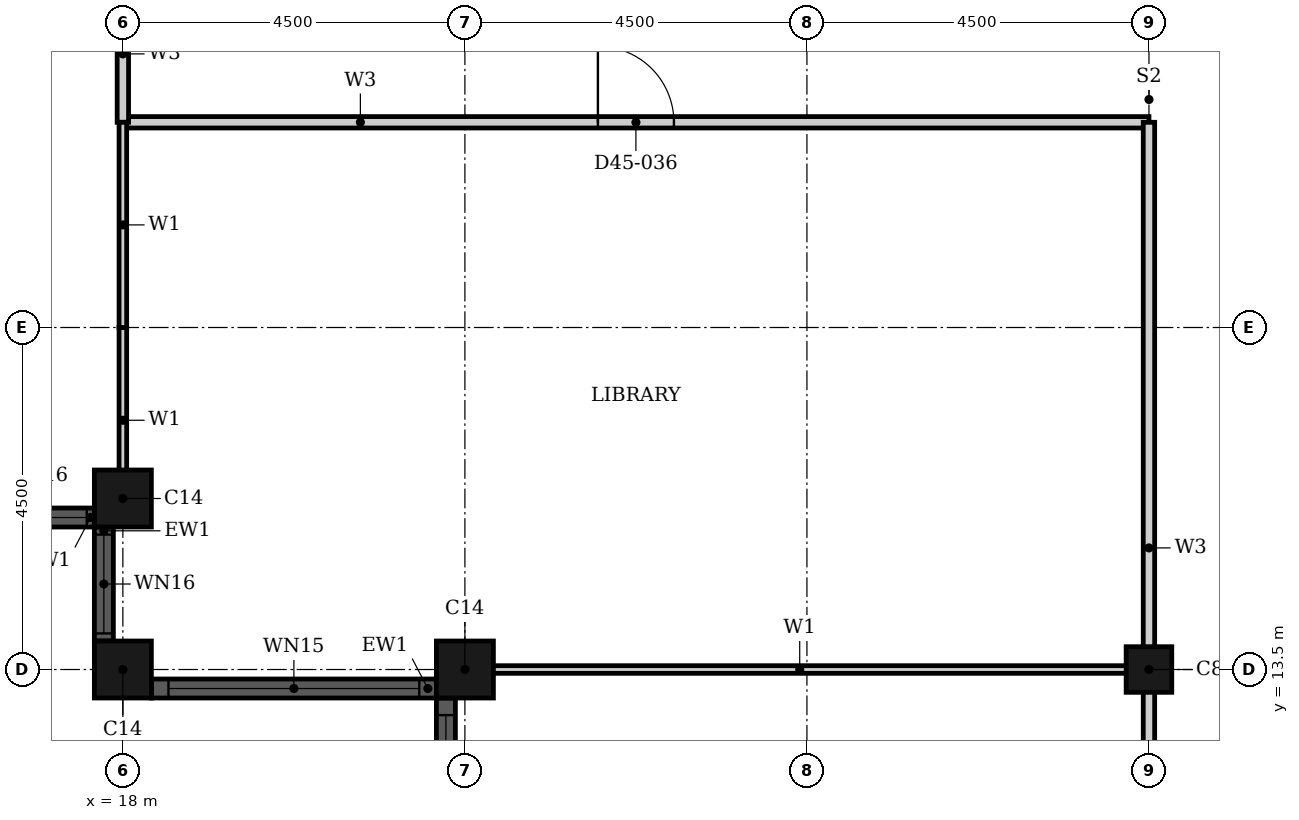
"""IFC4 building model, lengths in metres.
Left out: names, types, materials, properties, quantities, classifications, styles, units other than length and angle.
Written with IfcOpenShell. Run it as: python <this file> out.ifc"""

import sys

from ifc_helpers import new_model, si_unit, direction, frame, frame_2d, origin, origin_2d, place, context, subcontext, project, spatial, rectangle, hollow_rectangle, extrude, element, fill, save


model = new_model("IFC4")
c1 = context("Model", 3, precision=1e-05, world=origin(), true_north=direction((0.0, 1.0)))
c2 = subcontext(c1, "Body", "Model", "MODEL_VIEW")
j1 = project(units=[si_unit("LENGTHUNIT", "METRE"), si_unit("PLANEANGLEUNIT", "RADIAN")], contexts=[c1])
p1 = place(None, origin())
s1 = spatial("IfcSite", under=j1, at=p1, CompositionType="ELEMENT")
p2 = place(p1, origin())
s2 = spatial("IfcBuilding", under=s1, at=p2, CompositionType="ELEMENT")
p3 = place(p2, frame((0.0, 0.0, 180.2)))
s3 = spatial("IfcBuildingStorey", under=s2, at=p3, CompositionType="ELEMENT", Elevation=180.2)
for number, where, z_axis, x_axis in (
    (1, (18.0, 15.75, 0.0), (0.0, 0.0, 1.0), (1.0, 0.0, 0.0)),
    (2, (18.0, 13.5, 0.0), (0.0, 0.0, 1.0), (1.0, 0.0, 0.0)),
    (3, (22.5, 13.5, 0.0), (0.0, 0.0, 1.0), (1.0, 0.0, 0.0)),
):
    element("IfcColumn", number, at=place(p3, frame(where, z_axis=z_axis, x_axis=x_axis)), inside=s3, PredefinedType="COLUMN", context=c2, shape_type="SweptSolid", body=[
        extrude(hollow_rectangle(XDim=0.75, YDim=0.75, WallThickness=0.024, at=origin_2d()), origin(), (0.0, 0.0, 1.0), 3.7),
    ])
p4 = place(p3, frame((31.5, 13.5, 0.0), z_axis=(0.0, 0.0, 1.0), x_axis=(1.0, 0.0, 0.0)))
e4 = element("IfcColumn", 4, at=p4, inside=s3, PredefinedType="COLUMN", context=c2, shape_type="SweptSolid", body=[
    extrude(hollow_rectangle(XDim=0.6, YDim=0.6, WallThickness=0.02, at=origin_2d()), origin(), (0.0, 0.0, 1.0), 3.7),
])
p5 = place(p3, frame((16.125, 15.5, 0.0), z_axis=(0.0, 0.0, 1.0), x_axis=(1.0, 0.0, 0.0)))
e5 = element("IfcWall", 5, at=p5, inside=s3, PredefinedType="SOLIDWALL", context=c2, shape_type="SweptSolid", body=[
    extrude(rectangle(XDim=1.5, YDim=0.25, at=frame_2d((0.75, 0.0))), origin(), (0.0, 0.0, 1.0), 3.7),
])
p6 = place(p5, frame((0.1, 0.0, 0.9)))
e6 = element("IfcOpeningElement", 6, at=p6, cuts=e5, PredefinedType="OPENING", context=c2, shape_type="SweptSolid", body=[
    extrude(rectangle(XDim=1.3, YDim=1.85, at=frame_2d((0.65, 0.925))), frame((0.0, 0.135, 0.0), z_axis=(0.0, -1.0, 0.0), x_axis=(1.0, 0.0, 0.0)), (0.0, 0.0, 1.0), 0.27),
])
p7 = place(p3, frame((17.75, 15.375, 0.0), z_axis=(0.0, 0.0, 1.0), x_axis=(0.0, -1.0, 0.0)))
e7 = element("IfcWall", 7, at=p7, inside=s3, PredefinedType="SOLIDWALL", context=c2, shape_type="SweptSolid", body=[
    extrude(rectangle(XDim=1.5, YDim=0.25, at=frame_2d((0.75, 0.0))), origin(), (0.0, 0.0, 1.0), 3.7),
])
p8 = place(p7, frame((0.1, 0.0, 0.9)))
e8 = element("IfcOpeningElement", 8, at=p8, cuts=e7, PredefinedType="OPENING", context=c2, shape_type="SweptSolid", body=[
    extrude(rectangle(XDim=1.3, YDim=1.85, at=frame_2d((0.65, 0.925))), frame((0.0, 0.135, 0.0), z_axis=(0.0, -1.0, 0.0), x_axis=(1.0, 0.0, 0.0)), (0.0, 0.0, 1.0), 0.27),
])
p9 = place(p3, frame((18.375, 13.25, 0.0), z_axis=(0.0, 0.0, 1.0), x_axis=(1.0, 0.0, 0.0)))
e9 = element("IfcWall", 9, at=p9, inside=s3, PredefinedType="SOLIDWALL", context=c2, shape_type="SweptSolid", body=[
    extrude(rectangle(XDim=3.75, YDim=0.25, at=frame_2d((1.875, 0.0))), origin(), (0.0, 0.0, 1.0), 3.7),
])
p10 = place(p9, frame((0.225, 0.0, 0.45)))
e10 = element("IfcOpeningElement", 10, at=p10, cuts=e9, PredefinedType="OPENING", context=c2, shape_type="SweptSolid", body=[
    extrude(rectangle(XDim=3.3, YDim=2.3, at=frame_2d((1.65, 1.15))), frame((0.0, 0.135, 0.0), z_axis=(0.0, -1.0, 0.0), x_axis=(1.0, 0.0, 0.0)), (0.0, 0.0, 1.0), 0.27),
])
p11 = place(p3, frame((22.25, 13.125, 0.0), z_axis=(0.0, 0.0, 1.0), x_axis=(0.0, -1.0, 0.0)))
e11 = element("IfcWall", 11, at=p11, inside=s3, PredefinedType="SOLIDWALL", context=c2, shape_type="SweptSolid", body=[
    extrude(rectangle(XDim=8.25, YDim=0.25, at=frame_2d((4.125, 0.0))), origin(), (0.0, 0.0, 1.0), 3.7),
])
p12 = place(p11, frame((0.225, 0.0, 0.45)))
e12 = element("IfcOpeningElement", 12, at=p12, cuts=e11, PredefinedType="OPENING", context=c2, shape_type="SweptSolid", body=[
    extrude(rectangle(XDim=3.3, YDim=2.3, at=frame_2d((1.65, 1.15))), frame((0.0, 0.135, 0.0), z_axis=(0.0, -1.0, 0.0), x_axis=(1.0, 0.0, 0.0)), (0.0, 0.0, 1.0), 0.27),
])
p13 = place(p11, frame((4.725, 0.0, 0.45)))
e13 = element("IfcOpeningElement", 13, at=p13, cuts=e11, PredefinedType="OPENING", context=c2, shape_type="SweptSolid", body=[
    extrude(rectangle(XDim=3.3, YDim=2.3, at=frame_2d((1.65, 1.15))), frame((0.0, 0.135, 0.0), z_axis=(0.0, -1.0, 0.0), x_axis=(1.0, 0.0, 0.0)), (0.0, 0.0, 1.0), 0.27),
])
p14 = place(p3, frame((18.0, 20.7, 0.0), z_axis=(0.0, 0.0, 1.0), x_axis=(1.0, 0.0, 0.0)))
e14 = element("IfcWall", 14, at=p14, inside=s3, PredefinedType="PARTITIONING", context=c2, shape_type="SweptSolid", body=[
    extrude(rectangle(XDim=13.5, YDim=0.15, at=frame_2d((6.75, 0.0))), origin(), (0.0, 0.0, 1.0), 3.4),
])
p15 = place(p14, frame((6.25, 0.0, 0.0)))
e15 = element("IfcOpeningElement", 15, at=p15, cuts=e14, PredefinedType="OPENING", context=c2, shape_type="SweptSolid", body=[
    extrude(rectangle(XDim=1.0, YDim=2.1, at=frame_2d((0.5, 1.05))), frame((0.0, 0.085, 0.0), z_axis=(0.0, -1.0, 0.0), x_axis=(1.0, 0.0, 0.0)), (0.0, 0.0, 1.0), 0.17),
])
p16 = place(p3, frame((18.0, 20.7, 0.0), z_axis=(0.0, 0.0, 1.0), x_axis=(0.0, 1.0, 0.0)))
e16 = element("IfcWall", 16, at=p16, inside=s3, PredefinedType="PARTITIONING", context=c2, shape_type="SweptSolid", body=[
    extrude(rectangle(XDim=1.8, YDim=0.15, at=frame_2d((0.9, 0.0))), origin(), (0.0, 0.0, 1.0), 3.4),
])
p17 = place(p3, frame((31.5, 4.5, 0.0), z_axis=(0.0, 0.0, 1.0), x_axis=(0.0, 1.0, 0.0)))
e17 = element("IfcWall", 17, at=p17, inside=s3, PredefinedType="PARTITIONING", context=c2, shape_type="SweptSolid", body=[
    extrude(rectangle(XDim=16.2, YDim=0.15, at=frame_2d((8.1, 0.0))), origin(), (0.0, 0.0, 1.0), 2.68),
])
p18 = place(p17, frame((4.0, 0.0, 0.0)))
e18 = element("IfcOpeningElement", 18, at=p18, cuts=e17, PredefinedType="OPENING", context=c2, shape_type="SweptSolid", body=[
    extrude(rectangle(XDim=1.0, YDim=2.1, at=frame_2d((0.5, 1.05))), frame((0.0, 0.085, 0.0), z_axis=(0.0, -1.0, 0.0), x_axis=(1.0, 0.0, 0.0)), (0.0, 0.0, 1.0), 0.17),
])
p19 = place(p3, frame((22.31, 13.5, 0.0), z_axis=(0.0, 0.0, 1.0), x_axis=(1.0, 0.0, 0.0)))
e19 = element("IfcWall", 19, at=p19, inside=s3, PredefinedType="PARTITIONING", context=c2, shape_type="SweptSolid", body=[
    extrude(rectangle(XDim=9.19, YDim=0.1, at=frame_2d((4.595, 0.0))), origin(), (0.0, 0.0, 1.0), 2.48),
])
p20 = place(p3, frame((18.0, 15.56, 0.0), z_axis=(0.0, 0.0, 1.0), x_axis=(0.0, 1.0, 0.0)))
e20 = element("IfcWall", 20, at=p20, inside=s3, PredefinedType="PARTITIONING", context=c2, shape_type="SweptSolid", body=[
    extrude(rectangle(XDim=2.439, YDim=0.1, at=frame_2d((1.219, 0.0))), origin(), (0.0, 0.0, 1.0), 3.4),
])
p21 = place(p3, frame((18.0, 18.0, 0.0), z_axis=(0.0, 0.0, 1.0), x_axis=(0.0, 1.0, 0.0)))
e21 = element("IfcWall", 21, at=p21, inside=s3, PredefinedType="PARTITIONING", context=c2, shape_type="SweptSolid", body=[
    extrude(rectangle(XDim=2.7, YDim=0.1, at=frame_2d((1.35, 0.0))), origin(), (0.0, 0.0, 1.0), 3.4),
])
p22 = place(p6, origin())
e22 = element("IfcWindow", 22, at=p22, inside=s3, PartitioningType="SINGLE_PANEL", PredefinedType="WINDOW", context=c2, shape_type="SweptSolid", body=[
    extrude(rectangle(XDim=1.3, YDim=1.85, at=frame_2d((0.65, 0.925))), frame((0.0, 0.03, 0.0), z_axis=(0.0, -1.0, 0.0), x_axis=(1.0, 0.0, 0.0)), (0.0, 0.0, 1.0), 0.06),
])
fill(e6, e22)
p23 = place(p8, origin())
e23 = element("IfcWindow", 23, at=p23, inside=s3, PartitioningType="SINGLE_PANEL", PredefinedType="WINDOW", context=c2, shape_type="SweptSolid", body=[
    extrude(rectangle(XDim=1.3, YDim=1.85, at=frame_2d((0.65, 0.925))), frame((0.0, 0.03, 0.0), z_axis=(0.0, -1.0, 0.0), x_axis=(1.0, 0.0, 0.0)), (0.0, 0.0, 1.0), 0.06),
])
fill(e8, e23)
p24 = place(p10, origin())
e24 = element("IfcWindow", 24, at=p24, inside=s3, PartitioningType="SINGLE_PANEL", PredefinedType="WINDOW", context=c2, shape_type="SweptSolid", body=[
    extrude(rectangle(XDim=3.3, YDim=2.3, at=frame_2d((1.65, 1.15))), frame((0.0, 0.03, 0.0), z_axis=(0.0, -1.0, 0.0), x_axis=(1.0, 0.0, 0.0)), (0.0, 0.0, 1.0), 0.06),
])
fill(e10, e24)
p25 = place(p12, origin())
e25 = element("IfcWindow", 25, at=p25, inside=s3, PartitioningType="SINGLE_PANEL", PredefinedType="WINDOW", context=c2, shape_type="SweptSolid", body=[
    extrude(rectangle(XDim=3.3, YDim=2.3, at=frame_2d((1.65, 1.15))), frame((0.0, 0.03, 0.0), z_axis=(0.0, -1.0, 0.0), x_axis=(1.0, 0.0, 0.0)), (0.0, 0.0, 1.0), 0.06),
])
fill(e12, e25)
p26 = place(p15, origin())
e26 = element("IfcDoor", 26, at=p26, inside=s3, OperationType="SINGLE_SWING_RIGHT", PredefinedType="DOOR", context=c2, shape_type="SweptSolid", body=[
    extrude(rectangle(XDim=1.0, YDim=2.1, at=frame_2d((0.5, 1.05))), frame((0.0, 0.025, 0.0), z_axis=(0.0, -1.0, 0.0), x_axis=(1.0, 0.0, 0.0)), (0.0, 0.0, 1.0), 0.05),
])
fill(e15, e26)
save(model, sys.argv[1])
